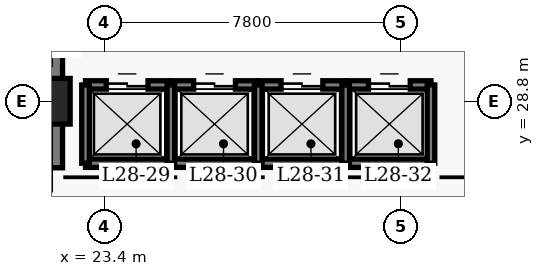
"""IFC4 building model, lengths in metres.
Left out: names, types, materials, properties, quantities, classifications, styles, units other than length and angle.
Written with IfcOpenShell. Run it as: python <this file> out.ifc"""

import sys

from ifc_helpers import new_model, si_unit, direction, frame, frame_2d, origin, origin_2d, place, context, subcontext, project, spatial, rectangle, extrude, element, fill, save


model = new_model("IFC4")
c1 = context("Model", 3, precision=1e-05, world=origin(), true_north=direction((0.0, 1.0)))
c2 = subcontext(c1, "Body", "Model", "MODEL_VIEW")
j1 = project(units=[si_unit("LENGTHUNIT", "METRE"), si_unit("PLANEANGLEUNIT", "RADIAN")], contexts=[c1])
p1 = place(None, origin())
s1 = spatial("IfcSite", under=j1, at=p1, CompositionType="ELEMENT")
p2 = place(p1, origin())
s2 = spatial("IfcBuilding", under=s1, at=p2, CompositionType="ELEMENT")
p3 = place(p2, frame((0.0, 0.0, 114.6)))
s3 = spatial("IfcBuildingStorey", under=s2, at=p3, CompositionType="ELEMENT", Elevation=114.6)
p4 = place(p3, frame((21.9, 27.05, 0.0), z_axis=(0.0, 0.0, 1.0), x_axis=(0.0, 1.0, 0.0)))
e1 = element("IfcWall", 1, at=p4, inside=s3, PredefinedType="SHEAR", context=c2, shape_type="SweptSolid", body=[
    extrude(rectangle(XDim=13.67, YDim=0.8, at=frame_2d((6.835, 0.0))), origin(), (0.0, 0.0, 1.0), 3.8),
])
p5 = place(p3, frame((21.9, 28.8, 0.0), z_axis=(0.0, 0.0, 1.0), x_axis=(1.0, 0.0, 0.0)))
e2 = element("IfcColumn", 2, at=p5, inside=s3, PredefinedType="COLUMN", context=c2, shape_type="SweptSolid", body=[
    extrude(rectangle(XDim=1.2, YDim=1.2, at=origin_2d()), origin(), (0.0, 0.0, 1.0), 3.8),
])
p6 = place(p3, frame((22.905, 29.23, 0.0), z_axis=(0.0, 0.0, 1.0), x_axis=(1.0, 0.0, 0.0)))
e3 = element("IfcWall", 3, at=p6, inside=s3, PredefinedType="SHEAR", context=c2, shape_type="SweptSolid", body=[
    extrude(rectangle(XDim=2.245, YDim=0.22, at=frame_2d((1.123, 0.0))), origin(), (0.0, 0.0, 1.0), 3.8),
])
p7 = place(p6, frame((0.545, 0.0, 0.0)))
e4 = element("IfcOpeningElement", 4, at=p7, cuts=e3, PredefinedType="OPENING", context=c2, shape_type="SweptSolid", body=[
    extrude(rectangle(XDim=1.1, YDim=2.15, at=frame_2d((0.55, 1.075))), frame((0.0, 0.12, 0.0), z_axis=(0.0, -1.0, 0.0), x_axis=(1.0, 0.0, 0.0)), (0.0, 0.0, 1.0), 0.24),
])
p8 = place(p3, frame((22.905, 27.17, 0.0), z_axis=(0.0, 0.0, 1.0), x_axis=(1.0, 0.0, 0.0)))
e5 = element("IfcWall", 5, at=p8, inside=s3, PredefinedType="SHEAR", context=c2, shape_type="SweptSolid", body=[
    extrude(rectangle(XDim=2.245, YDim=0.22, at=frame_2d((1.123, 0.0))), origin(), (0.0, 0.0, 1.0), 3.8),
])
p9 = place(p3, frame((22.905, 27.17, 0.0), z_axis=(0.0, 0.0, 1.0), x_axis=(0.0, 1.0, 0.0)))
e6 = element("IfcWall", 6, at=p9, inside=s3, PredefinedType="SHEAR", context=c2, shape_type="SweptSolid", body=[
    extrude(rectangle(XDim=2.06, YDim=0.2, at=frame_2d((1.03, 0.0))), origin(), (0.0, 0.0, 1.0), 3.8),
])
p10 = place(p3, frame((25.15, 29.23, 0.0), z_axis=(0.0, 0.0, 1.0), x_axis=(1.0, 0.0, 0.0)))
e7 = element("IfcWall", 7, at=p10, inside=s3, PredefinedType="SHEAR", context=c2, shape_type="SweptSolid", body=[
    extrude(rectangle(XDim=2.3, YDim=0.22, at=frame_2d((1.15, 0.0))), origin(), (0.0, 0.0, 1.0), 3.8),
])
p11 = place(p10, frame((0.6, 0.0, 0.0)))
e8 = element("IfcOpeningElement", 8, at=p11, cuts=e7, PredefinedType="OPENING", context=c2, shape_type="SweptSolid", body=[
    extrude(rectangle(XDim=1.1, YDim=2.15, at=frame_2d((0.55, 1.075))), frame((0.0, 0.12, 0.0), z_axis=(0.0, -1.0, 0.0), x_axis=(1.0, 0.0, 0.0)), (0.0, 0.0, 1.0), 0.24),
])
p12 = place(p3, frame((25.15, 27.17, 0.0), z_axis=(0.0, 0.0, 1.0), x_axis=(1.0, 0.0, 0.0)))
e9 = element("IfcWall", 9, at=p12, inside=s3, PredefinedType="SHEAR", context=c2, shape_type="SweptSolid", body=[
    extrude(rectangle(XDim=2.3, YDim=0.22, at=frame_2d((1.15, 0.0))), origin(), (0.0, 0.0, 1.0), 3.8),
])
p13 = place(p3, frame((25.15, 27.17, 0.0), z_axis=(0.0, 0.0, 1.0), x_axis=(0.0, 1.0, 0.0)))
e10 = element("IfcWall", 10, at=p13, inside=s3, PredefinedType="SHEAR", context=c2, shape_type="SweptSolid", body=[
    extrude(rectangle(XDim=2.06, YDim=0.2, at=frame_2d((1.03, 0.0))), origin(), (0.0, 0.0, 1.0), 3.8),
])
p14 = place(p3, frame((27.45, 29.23, 0.0), z_axis=(0.0, 0.0, 1.0), x_axis=(1.0, 0.0, 0.0)))
e11 = element("IfcWall", 11, at=p14, inside=s3, PredefinedType="SHEAR", context=c2, shape_type="SweptSolid", body=[
    extrude(rectangle(XDim=2.3, YDim=0.22, at=frame_2d((1.15, 0.0))), origin(), (0.0, 0.0, 1.0), 3.8),
])
p15 = place(p14, frame((0.6, 0.0, 0.0)))
e12 = element("IfcOpeningElement", 12, at=p15, cuts=e11, PredefinedType="OPENING", context=c2, shape_type="SweptSolid", body=[
    extrude(rectangle(XDim=1.1, YDim=2.15, at=frame_2d((0.55, 1.075))), frame((0.0, 0.12, 0.0), z_axis=(0.0, -1.0, 0.0), x_axis=(1.0, 0.0, 0.0)), (0.0, 0.0, 1.0), 0.24),
])
p16 = place(p3, frame((27.45, 27.17, 0.0), z_axis=(0.0, 0.0, 1.0), x_axis=(1.0, 0.0, 0.0)))
e13 = element("IfcWall", 13, at=p16, inside=s3, PredefinedType="SHEAR", context=c2, shape_type="SweptSolid", body=[
    extrude(rectangle(XDim=2.3, YDim=0.22, at=frame_2d((1.15, 0.0))), origin(), (0.0, 0.0, 1.0), 3.8),
])
p17 = place(p3, frame((27.45, 27.17, 0.0), z_axis=(0.0, 0.0, 1.0), x_axis=(0.0, 1.0, 0.0)))
e14 = element("IfcWall", 14, at=p17, inside=s3, PredefinedType="SHEAR", context=c2, shape_type="SweptSolid", body=[
    extrude(rectangle(XDim=2.06, YDim=0.2, at=frame_2d((1.03, 0.0))), origin(), (0.0, 0.0, 1.0), 3.8),
])
p18 = place(p3, frame((29.75, 29.23, 0.0), z_axis=(0.0, 0.0, 1.0), x_axis=(1.0, 0.0, 0.0)))
e15 = element("IfcWall", 15, at=p18, inside=s3, PredefinedType="SHEAR", context=c2, shape_type="SweptSolid", body=[
    extrude(rectangle(XDim=2.245, YDim=0.22, at=frame_2d((1.123, 0.0))), origin(), (0.0, 0.0, 1.0), 3.8),
])
p19 = place(p18, frame((0.6, 0.0, 0.0)))
e16 = element("IfcOpeningElement", 16, at=p19, cuts=e15, PredefinedType="OPENING", context=c2, shape_type="SweptSolid", body=[
    extrude(rectangle(XDim=1.1, YDim=2.15, at=frame_2d((0.55, 1.075))), frame((0.0, 0.12, 0.0), z_axis=(0.0, -1.0, 0.0), x_axis=(1.0, 0.0, 0.0)), (0.0, 0.0, 1.0), 0.24),
])
p20 = place(p3, frame((29.75, 27.17, 0.0), z_axis=(0.0, 0.0, 1.0), x_axis=(1.0, 0.0, 0.0)))
e17 = element("IfcWall", 17, at=p20, inside=s3, PredefinedType="SHEAR", context=c2, shape_type="SweptSolid", body=[
    extrude(rectangle(XDim=2.245, YDim=0.22, at=frame_2d((1.123, 0.0))), origin(), (0.0, 0.0, 1.0), 3.8),
])
for number, where, z_axis, x_axis in (
    (18, (29.75, 27.17, 0.0), (0.0, 0.0, 1.0), (0.0, 1.0, 0.0)),
    (19, (31.995, 27.17, 0.0), (0.0, 0.0, 1.0), (0.0, 1.0, 0.0)),
):
    element("IfcWall", number, at=place(p3, frame(where, z_axis=z_axis, x_axis=x_axis)), inside=s3, PredefinedType="SHEAR", context=c2, shape_type="SweptSolid", body=[
        extrude(rectangle(XDim=2.06, YDim=0.2, at=frame_2d((1.03, 0.0))), origin(), (0.0, 0.0, 1.0), 3.8),
    ])
p21 = place(p7, origin())
e20 = element("IfcDoor", 20, at=p21, inside=s3, OperationType="DOUBLE_DOOR_SLIDING", PredefinedType="DOOR", context=c2, shape_type="SweptSolid", body=[
    extrude(rectangle(XDim=1.1, YDim=2.15, at=frame_2d((0.55, 1.075))), frame((0.0, 0.025, 0.0), z_axis=(0.0, -1.0, 0.0), x_axis=(1.0, 0.0, 0.0)), (0.0, 0.0, 1.0), 0.05),
])
fill(e4, e20)
p22 = place(p11, origin())
e21 = element("IfcDoor", 21, at=p22, inside=s3, OperationType="DOUBLE_DOOR_SLIDING", PredefinedType="DOOR", context=c2, shape_type="SweptSolid", body=[
    extrude(rectangle(XDim=1.1, YDim=2.15, at=frame_2d((0.55, 1.075))), frame((0.0, 0.025, 0.0), z_axis=(0.0, -1.0, 0.0), x_axis=(1.0, 0.0, 0.0)), (0.0, 0.0, 1.0), 0.05),
])
fill(e8, e21)
p23 = place(p15, origin())
e22 = element("IfcDoor", 22, at=p23, inside=s3, OperationType="DOUBLE_DOOR_SLIDING", PredefinedType="DOOR", context=c2, shape_type="SweptSolid", body=[
    extrude(rectangle(XDim=1.1, YDim=2.15, at=frame_2d((0.55, 1.075))), frame((0.0, 0.025, 0.0), z_axis=(0.0, -1.0, 0.0), x_axis=(1.0, 0.0, 0.0)), (0.0, 0.0, 1.0), 0.05),
])
fill(e12, e22)
p24 = place(p19, origin())
e23 = element("IfcDoor", 23, at=p24, inside=s3, OperationType="DOUBLE_DOOR_SLIDING", PredefinedType="DOOR", context=c2, shape_type="SweptSolid", body=[
    extrude(rectangle(XDim=1.1, YDim=2.15, at=frame_2d((0.55, 1.075))), frame((0.0, 0.025, 0.0), z_axis=(0.0, -1.0, 0.0), x_axis=(1.0, 0.0, 0.0)), (0.0, 0.0, 1.0), 0.05),
])
fill(e16, e23)
save(model, sys.argv[1])
